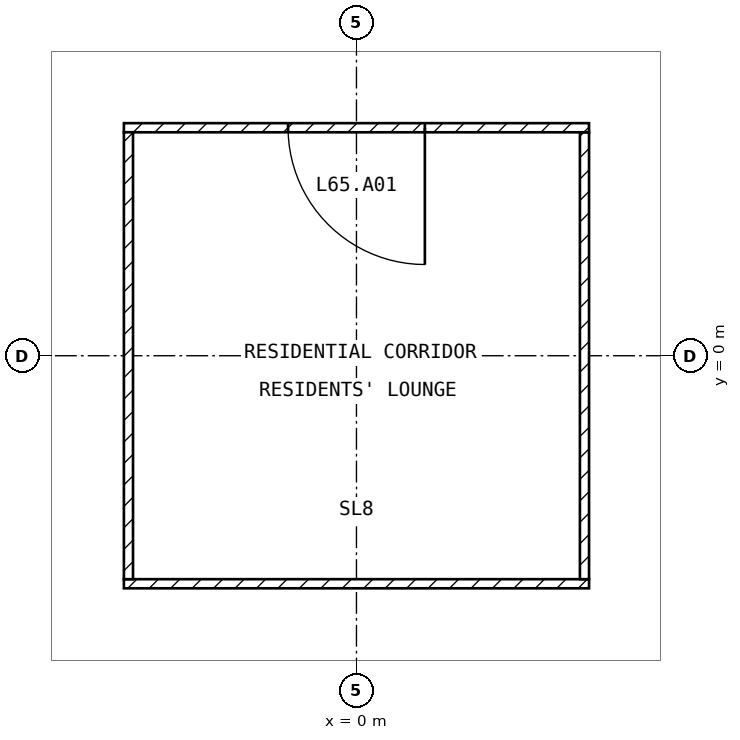
"""IFC4 building model, lengths in metres.
Left out: names, types, materials, properties, quantities, classifications, styles, units other than length and angle.
Written with IfcOpenShell. Run it as: python <this file> out.ifc"""

import sys

from ifc_helpers import new_model, si_unit, direction, frame, frame_2d, origin, place, context, subcontext, project, spatial, rectangle, extrude, element, fill, save


model = new_model("IFC4")
c1 = context("Model", 3, precision=1e-05, world=origin(), true_north=direction((0.0, 1.0)))
c2 = subcontext(c1, "Body", "Model", "MODEL_VIEW")
j1 = project(units=[si_unit("LENGTHUNIT", "METRE"), si_unit("PLANEANGLEUNIT", "RADIAN")], contexts=[c1])
p1 = place(None, origin())
s1 = spatial("IfcSite", under=j1, at=p1, CompositionType="ELEMENT")
p2 = place(p1, origin())
s2 = spatial("IfcBuilding", under=s1, at=p2, CompositionType="ELEMENT")
p3 = place(p2, frame((0.0, 0.0, 257.0)))
s3 = spatial("IfcBuildingStorey", under=s2, at=p3, CompositionType="ELEMENT", Elevation=257.0)
p4 = place(p3, frame((-3.06, -3.0, 0.0), z_axis=(0.0, 0.0, 1.0), x_axis=(1.0, 0.0, 0.0)))
e1 = element("IfcWall", 1, at=p4, inside=s3, PredefinedType="PARTITIONING", context=c2, shape_type="SweptSolid", body=[
    extrude(rectangle(XDim=6.12, YDim=0.12, at=frame_2d((3.06, 0.0))), origin(), (0.0, 0.0, 1.0), 3.25),
])
p5 = place(p3, frame((3.0, -2.94, 0.0), z_axis=(0.0, 0.0, 1.0), x_axis=(0.0, 1.0, 0.0)))
e2 = element("IfcWall", 2, at=p5, inside=s3, PredefinedType="PARTITIONING", context=c2, shape_type="SweptSolid", body=[
    extrude(rectangle(XDim=5.88, YDim=0.12, at=frame_2d((2.94, 0.0))), origin(), (0.0, 0.0, 1.0), 3.25),
])
p6 = place(p3, frame((3.06, 3.0, 0.0), z_axis=(0.0, 0.0, 1.0), x_axis=(-1.0, 0.0, 0.0)))
e3 = element("IfcWall", 3, at=p6, inside=s3, PredefinedType="PARTITIONING", context=c2, shape_type="SweptSolid", body=[
    extrude(rectangle(XDim=6.12, YDim=0.12, at=frame_2d((3.06, 0.0))), origin(), (0.0, 0.0, 1.0), 3.25),
])
p7 = place(p6, frame((2.16, 0.0, 0.0)))
e4 = element("IfcOpeningElement", 4, at=p7, cuts=e3, PredefinedType="OPENING", context=c2, shape_type="SweptSolid", body=[
    extrude(rectangle(XDim=1.8, YDim=2.1, at=frame_2d((0.9, 1.05))), frame((0.0, 0.07, 0.0), z_axis=(0.0, -1.0, 0.0), x_axis=(1.0, 0.0, 0.0)), (0.0, 0.0, 1.0), 0.14),
])
p8 = place(p3, frame((-3.0, 2.94, 0.0), z_axis=(0.0, 0.0, 1.0), x_axis=(0.0, -1.0, 0.0)))
e5 = element("IfcWall", 5, at=p8, inside=s3, PredefinedType="PARTITIONING", context=c2, shape_type="SweptSolid", body=[
    extrude(rectangle(XDim=5.88, YDim=0.12, at=frame_2d((2.94, 0.0))), origin(), (0.0, 0.0, 1.0), 3.25),
])
p9 = place(p7, origin())
e6 = element("IfcDoor", 6, at=p9, inside=s3, OperationType="SINGLE_SWING_LEFT", PredefinedType="DOOR", context=c2, shape_type="SweptSolid", body=[
    extrude(rectangle(XDim=1.8, YDim=2.1, at=frame_2d((0.9, 1.05))), frame((0.0, 0.025, 0.0), z_axis=(0.0, -1.0, 0.0), x_axis=(1.0, 0.0, 0.0)), (0.0, 0.0, 1.0), 0.05),
])
fill(e4, e6)
save(model, sys.argv[1])
